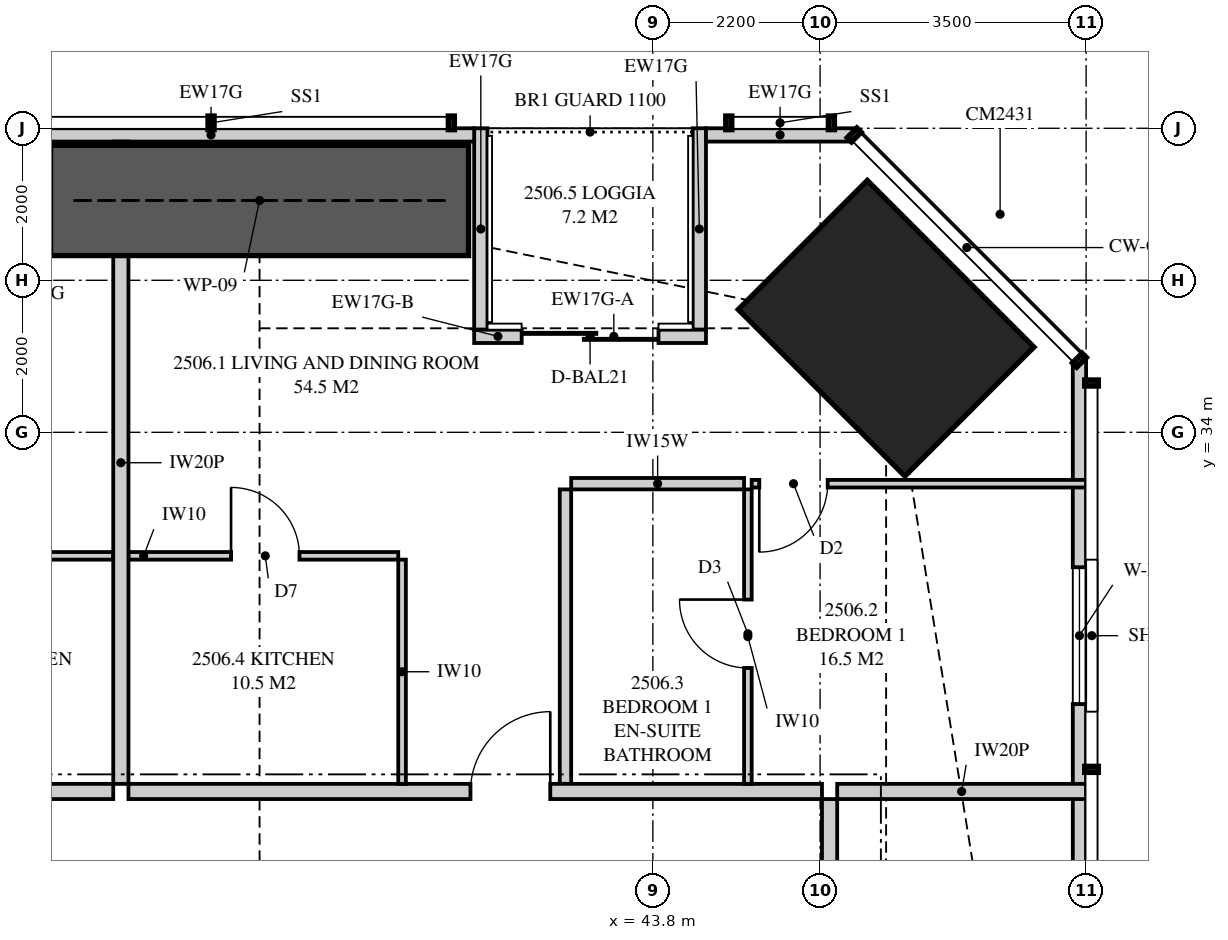
"""IFC4 building model, lengths in metres.
Left out: names, types, materials, properties, quantities, classifications, styles, units other than length and angle.
Written with IfcOpenShell. Run it as: python <this file> out.ifc"""

import sys

from ifc_helpers import new_model, si_unit, direction, frame, frame_2d, origin, origin_2d, place, context, subcontext, project, spatial, polyline, rectangle, outline, extrude, element, fill, save


model = new_model("IFC4")
c1 = context("Model", 3, precision=1e-05, world=origin(), true_north=direction((0.0, 1.0)))
c2 = subcontext(c1, "Body", "Model", "MODEL_VIEW")
j1 = project(units=[si_unit("LENGTHUNIT", "METRE"), si_unit("PLANEANGLEUNIT", "RADIAN")], contexts=[c1])
p1 = place(None, origin())
s1 = spatial("IfcSite", under=j1, at=p1, CompositionType="ELEMENT")
p2 = place(p1, origin())
s2 = spatial("IfcBuilding", under=s1, at=p2, CompositionType="ELEMENT")
p3 = place(p2, frame((0.0, 0.0, 94.8)))
s3 = spatial("IfcBuildingStorey", under=s2, at=p3, CompositionType="ELEMENT", Elevation=94.8)
p4 = place(p3, frame((46.869, 35.369, 0.0), z_axis=(0.0, 0.0, 1.0), x_axis=(-0.707106781187, -0.707106781187, 0.0)))
e1 = element("IfcColumn", 1, at=p4, inside=s3, PredefinedType="COLUMN", context=c2, shape_type="SweptSolid", body=[
    extrude(rectangle(XDim=2.4, YDim=3.1, at=origin_2d()), origin(), (0.0, 0.0, 1.0), 3.35),
])
p5 = place(p3, frame((49.413, 3.051, 0.0), z_axis=(0.0, 0.0, 1.0), x_axis=(0.0, 1.0, 0.0)))
e2 = element("IfcWall", 2, at=p5, inside=s3, PredefinedType="SOLIDWALL", context=c2, shape_type="SweptSolid", body=[
    extrude(outline(polyline([(0.0, 0.0), (31.897, 0.0), (31.897, 3.11), (22.167, 3.11), (22.167, 2.15), (22.074, 2.15), (22.074, 3.11), (21.949, 3.11), (21.949, 2.15), (9.949, 2.15), (9.949, 3.11), (9.823, 3.11), (9.823, 2.15), (9.73, 2.15), (9.73, 3.11), (0.0, 3.11), (0.0, 0.0)])), frame((0.0, 0.087, 0.0), z_axis=(0.0, -1.0, 0.0), x_axis=(1.0, 0.0, 0.0)), (0.0, 0.0, 1.0), 0.175),
])
p6 = place(p5, frame((2.224, 0.0, 0.4)))
e3 = element("IfcOpeningElement", 3, at=p6, cuts=e2, PredefinedType="OPENING", context=c2, shape_type="SweptSolid", body=[
    extrude(rectangle(XDim=1.8, YDim=1.7, at=frame_2d((0.9, 0.85))), frame((0.0, 0.097, 0.0), z_axis=(0.0, -1.0, 0.0), x_axis=(1.0, 0.0, 0.0)), (0.0, 0.0, 1.0), 0.195),
])
p7 = place(p5, frame((14.849, 0.0, 0.4)))
e4 = element("IfcOpeningElement", 4, at=p7, cuts=e2, PredefinedType="OPENING", context=c2, shape_type="SweptSolid", body=[
    extrude(rectangle(XDim=1.2, YDim=1.7, at=frame_2d((0.6, 0.85))), frame((0.0, 0.097, 0.0), z_axis=(0.0, -1.0, 0.0), x_axis=(1.0, 0.0, 0.0)), (0.0, 0.0, 1.0), 0.195),
])
p8 = place(p5, frame((27.373, 0.0, 0.4)))
e5 = element("IfcOpeningElement", 5, at=p8, cuts=e2, PredefinedType="OPENING", context=c2, shape_type="SweptSolid", body=[
    extrude(rectangle(XDim=1.8, YDim=1.7, at=frame_2d((0.9, 0.85))), frame((0.0, 0.097, 0.0), z_axis=(0.0, -1.0, 0.0), x_axis=(1.0, 0.0, 0.0)), (0.0, 0.0, 1.0), 0.195),
])
p9 = place(p3, frame((46.449, 37.913, 0.0), z_axis=(0.0, 0.0, 1.0), x_axis=(-1.0, 0.0, 0.0)))
e6 = element("IfcWall", 6, at=p9, inside=s3, PredefinedType="SOLIDWALL", context=c2, shape_type="SweptSolid", body=[
    extrude(rectangle(XDim=1.95, YDim=0.175, at=frame_2d((0.975, 0.0))), origin(), (0.0, 0.0, 1.0), 3.11),
])
p10 = place(p3, frame((41.449, 37.913, 0.0), z_axis=(0.0, 0.0, 1.0), x_axis=(-1.0, 0.0, 0.0)))
e7 = element("IfcWall", 7, at=p10, inside=s3, PredefinedType="SOLIDWALL", context=c2, shape_type="SweptSolid", body=[
    extrude(outline(polyline([(0.0, 0.0), (6.924, 0.0), (6.924, 2.15), (2.824, 2.15), (2.824, 3.11), (2.666, 3.11), (2.666, 2.15), (2.62, 2.15), (2.62, 3.11), (0.0, 3.11), (0.0, 0.0)])), frame((0.0, 0.087, 0.0), z_axis=(0.0, -1.0, 0.0), x_axis=(1.0, 0.0, 0.0)), (0.0, 0.0, 1.0), 0.175),
])
p11 = place(p3, frame((44.499, 35.262, 0.0), z_axis=(0.0, 0.0, 1.0), x_axis=(-1.0, 0.0, 0.0)))
e8 = element("IfcWall", 8, at=p11, inside=s3, PredefinedType="SOLIDWALL", context=c2, shape_type="SweptSolid", body=[
    extrude(rectangle(XDim=2.425, YDim=0.175, at=frame_2d((1.212, 0.0))), origin(), (0.0, 0.0, 1.0), 2.15),
])
p12 = place(p11, frame((0.625, 0.0, 0.0)))
e9 = element("IfcOpeningElement", 9, at=p12, cuts=e8, PredefinedType="OPENING", context=c2, shape_type="SweptSolid", body=[
    extrude(rectangle(XDim=1.8, YDim=2.1, at=frame_2d((0.9, 1.05))), frame((0.0, 0.097, 0.0), z_axis=(0.0, -1.0, 0.0), x_axis=(1.0, 0.0, 0.0)), (0.0, 0.0, 1.0), 0.195),
])
p13 = place(p3, frame((42.074, 35.262, 0.0), z_axis=(0.0, 0.0, 1.0), x_axis=(-1.0, 0.0, 0.0)))
e10 = element("IfcWall", 10, at=p13, inside=s3, PredefinedType="SOLIDWALL", context=c2, shape_type="SweptSolid", body=[
    extrude(rectangle(XDim=0.625, YDim=0.175, at=frame_2d((0.312, 0.0))), origin(), (0.0, 0.0, 1.0), 2.51),
])
p14 = place(p3, frame((44.411, 38.0, 0.0), z_axis=(0.0, 0.0, 1.0), x_axis=(0.0, -1.0, 0.0)))
e11 = element("IfcWall", 11, at=p14, inside=s3, PredefinedType="SOLIDWALL", context=c2, shape_type="SweptSolid", body=[
    extrude(outline(polyline([(0.0, 0.0), (2.65, 0.0), (2.65, 2.15), (1.296, 2.15), (1.296, 3.11), (0.0, 3.11), (0.0, 0.0)])), frame((0.0, 0.087, 0.0), z_axis=(0.0, -1.0, 0.0), x_axis=(1.0, 0.0, 0.0)), (0.0, 0.0, 1.0), 0.175),
])
p15 = place(p3, frame((41.536, 38.0, 0.0), z_axis=(0.0, 0.0, 1.0), x_axis=(0.0, -1.0, 0.0)))
e12 = element("IfcWall", 12, at=p15, inside=s3, PredefinedType="SOLIDWALL", context=c2, shape_type="SweptSolid", body=[
    extrude(outline(polyline([(0.0, 0.0), (2.65, 0.0), (2.65, 2.51), (2.378, 2.51), (2.378, 2.15), (0.709, 2.15), (0.709, 3.11), (0.0, 3.11), (0.0, 0.0)])), frame((0.0, 0.087, 0.0), z_axis=(0.0, -1.0, 0.0), x_axis=(1.0, 0.0, 0.0)), (0.0, 0.0, 1.0), 0.175),
])
p16 = place(p3, frame((36.8, 37.825, 0.0), z_axis=(0.0, 0.0, 1.0), x_axis=(0.0, -1.0, 0.0)))
e13 = element("IfcWall", 13, at=p16, inside=s3, PredefinedType="PARTITIONING", context=c2, shape_type="SweptSolid", body=[
    extrude(outline(polyline([(0.529, 2.15), (0.0, 2.15), (0.0, 0.0), (0.529, 0.0), (0.529, 0.256), (1.021, 0.256), (1.021, 0.0), (8.45, 0.0), (8.45, 3.11), (1.685, 3.11), (1.685, 2.15), (1.021, 2.15), (1.021, 1.894), (0.529, 1.894), (0.529, 2.15)])), frame((0.0, 0.1, 0.0), z_axis=(0.0, -1.0, 0.0), x_axis=(1.0, 0.0, 0.0)), (0.0, 0.0, 1.0), 0.2),
])
p17 = place(p3, frame((29.3, 29.275, 0.0), z_axis=(0.0, 0.0, 1.0), x_axis=(1.0, 0.0, 0.0)))
e14 = element("IfcWall", 14, at=p17, inside=s3, PredefinedType="PARTITIONING", context=c2, shape_type="SweptSolid", body=[
    extrude(rectangle(XDim=7.4, YDim=0.2, at=frame_2d((3.7, 0.0))), origin(), (0.0, 0.0, 1.0), 3.11),
])
p18 = place(p17, frame((3.2, 0.0, 0.0)))
e15 = element("IfcOpeningElement", 15, at=p18, cuts=e14, PredefinedType="OPENING", context=c2, shape_type="SweptSolid", body=[
    extrude(rectangle(XDim=1.05, YDim=2.2, at=frame_2d((0.525, 1.1))), frame((0.0, 0.11, 0.0), z_axis=(0.0, -1.0, 0.0), x_axis=(1.0, 0.0, 0.0)), (0.0, 0.0, 1.0), 0.22),
])
p19 = place(p3, frame((33.75, 32.375, 0.0), z_axis=(0.0, 0.0, 1.0), x_axis=(1.0, 0.0, 0.0)))
e16 = element("IfcWall", 16, at=p19, inside=s3, PredefinedType="PARTITIONING", context=c2, shape_type="SweptSolid", body=[
    extrude(rectangle(XDim=2.95, YDim=0.1, at=frame_2d((1.475, 0.0))), origin(), (0.0, 0.0, 1.0), 3.11),
])
p20 = place(p19, frame((1.0, 0.0, 0.0)))
e17 = element("IfcOpeningElement", 17, at=p20, cuts=e16, PredefinedType="OPENING", context=c2, shape_type="SweptSolid", body=[
    extrude(rectangle(XDim=0.9, YDim=2.1, at=frame_2d((0.45, 1.05))), frame((0.0, 0.06, 0.0), z_axis=(0.0, -1.0, 0.0), x_axis=(1.0, 0.0, 0.0)), (0.0, 0.0, 1.0), 0.12),
])
p21 = place(p3, frame((36.9, 29.275, 0.0), z_axis=(0.0, 0.0, 1.0), x_axis=(1.0, 0.0, 0.0)))
e18 = element("IfcWall", 18, at=p21, inside=s3, PredefinedType="PARTITIONING", context=c2, shape_type="SweptSolid", body=[
    extrude(outline(polyline([(0.0, 0.0), (9.125, 0.0), (9.125, 3.11), (2.062, 3.11), (2.062, 2.541), (1.388, 2.541), (1.388, 3.11), (0.0, 3.11), (0.0, 0.0)])), frame((0.0, 0.1, 0.0), z_axis=(0.0, -1.0, 0.0), x_axis=(1.0, 0.0, 0.0)), (0.0, 0.0, 1.0), 0.2),
])
p22 = place(p21, frame((4.5, 0.0, 0.0)))
e19 = element("IfcOpeningElement", 19, at=p22, cuts=e18, PredefinedType="OPENING", context=c2, shape_type="SweptSolid", body=[
    extrude(rectangle(XDim=1.05, YDim=2.2, at=frame_2d((0.525, 1.1))), frame((0.0, 0.11, 0.0), z_axis=(0.0, -1.0, 0.0), x_axis=(1.0, 0.0, 0.0)), (0.0, 0.0, 1.0), 0.22),
])
p23 = place(p3, frame((45.05, 33.249, 0.0), z_axis=(0.0, 0.0, 1.0), x_axis=(0.0, -1.0, 0.0)))
e20 = element("IfcWall", 20, at=p23, inside=s3, PredefinedType="PARTITIONING", context=c2, shape_type="SweptSolid", body=[
    extrude(rectangle(XDim=3.874, YDim=0.1, at=frame_2d((1.937, 0.0))), origin(), (0.0, 0.0, 1.0), 3.11),
])
p24 = place(p23, frame((1.45, 0.0, 0.0)))
e21 = element("IfcOpeningElement", 21, at=p24, cuts=e20, PredefinedType="OPENING", context=c2, shape_type="SweptSolid", body=[
    extrude(rectangle(XDim=0.9, YDim=2.1, at=frame_2d((0.45, 1.05))), frame((0.0, 0.06, 0.0), z_axis=(0.0, -1.0, 0.0), x_axis=(1.0, 0.0, 0.0)), (0.0, 0.0, 1.0), 0.12),
])
p25 = place(p3, frame((45.1, 33.324, 0.0), z_axis=(0.0, 0.0, 1.0), x_axis=(1.0, 0.0, 0.0)))
e22 = element("IfcWall", 22, at=p25, inside=s3, PredefinedType="PARTITIONING", context=c2, shape_type="SweptSolid", body=[
    extrude(outline(polyline([(0.0, 0.0), (4.4, 0.0), (4.4, 3.11), (2.971, 3.11), (2.971, 2.15), (1.229, 2.15), (1.229, 3.11), (0.0, 3.11), (0.0, 0.0)])), frame((0.0, 0.05, 0.0), z_axis=(0.0, -1.0, 0.0), x_axis=(1.0, 0.0, 0.0)), (0.0, 0.0, 1.0), 0.1),
])
p26 = place(p25, frame((0.1, 0.0, 0.0)))
e23 = element("IfcOpeningElement", 23, at=p26, cuts=e22, PredefinedType="OPENING", context=c2, shape_type="SweptSolid", body=[
    extrude(rectangle(XDim=0.9, YDim=2.1, at=frame_2d((0.45, 1.05))), frame((0.0, 0.06, 0.0), z_axis=(0.0, -1.0, 0.0), x_axis=(1.0, 0.0, 0.0)), (0.0, 0.0, 1.0), 0.12),
])
p27 = place(p3, frame((42.725, 33.324, 0.0), z_axis=(0.0, 0.0, 1.0), x_axis=(1.0, 0.0, 0.0)))
e24 = element("IfcWall", 24, at=p27, inside=s3, PredefinedType="PLUMBINGWALL", context=c2, shape_type="SweptSolid", body=[
    extrude(rectangle(XDim=2.275, YDim=0.15, at=frame_2d((1.137, 0.0))), origin(), (0.0, 0.0, 1.0), 3.11),
])
p28 = place(p3, frame((42.65, 33.249, 0.0), z_axis=(0.0, 0.0, 1.0), x_axis=(0.0, -1.0, 0.0)))
e25 = element("IfcWall", 25, at=p28, inside=s3, PredefinedType="PLUMBINGWALL", context=c2, shape_type="SweptSolid", body=[
    extrude(rectangle(XDim=3.874, YDim=0.15, at=frame_2d((1.937, 0.0))), origin(), (0.0, 0.0, 1.0), 3.11),
])
p29 = place(p3, frame((36.9, 32.375, 0.0), z_axis=(0.0, 0.0, 1.0), x_axis=(1.0, 0.0, 0.0)))
e26 = element("IfcWall", 26, at=p29, inside=s3, PredefinedType="PARTITIONING", context=c2, shape_type="SweptSolid", body=[
    extrude(outline(polyline([(0.0, 0.0), (3.55, 0.0), (3.55, 3.11), (2.012, 3.11), (2.012, 2.541), (1.438, 2.541), (1.438, 3.11), (0.0, 3.11), (0.0, 0.0)])), frame((0.0, 0.05, 0.0), z_axis=(0.0, -1.0, 0.0), x_axis=(1.0, 0.0, 0.0)), (0.0, 0.0, 1.0), 0.1),
])
p30 = place(p29, frame((1.35, 0.0, 0.0)))
e27 = element("IfcOpeningElement", 27, at=p30, cuts=e26, PredefinedType="OPENING", context=c2, shape_type="SweptSolid", body=[
    extrude(rectangle(XDim=0.9, YDim=2.1, at=frame_2d((0.45, 1.05))), frame((0.0, 0.06, 0.0), z_axis=(0.0, -1.0, 0.0), x_axis=(1.0, 0.0, 0.0)), (0.0, 0.0, 1.0), 0.12),
])
p31 = place(p3, frame((40.5, 32.325, 0.0), z_axis=(0.0, 0.0, 1.0), x_axis=(0.0, -1.0, 0.0)))
e28 = element("IfcWall", 28, at=p31, inside=s3, PredefinedType="PARTITIONING", context=c2, shape_type="SweptSolid", body=[
    extrude(rectangle(XDim=2.95, YDim=0.1, at=frame_2d((1.475, 0.0))), origin(), (0.0, 0.0, 1.0), 3.11),
])
p32 = place(p3, frame((46.225, 29.275, 0.0), z_axis=(0.0, 0.0, 1.0), x_axis=(1.0, 0.0, 0.0)))
e29 = element("IfcWall", 29, at=p32, inside=s3, PredefinedType="PARTITIONING", context=c2, shape_type="SweptSolid", body=[
    extrude(outline(polyline([(0.0, 0.0), (3.275, 0.0), (3.275, 3.11), (2.554, 3.11), (2.554, 2.15), (0.805, 2.15), (0.805, 2.541), (0.306, 2.541), (0.306, 3.11), (0.0, 3.11), (0.0, 0.0)])), frame((0.0, 0.1, 0.0), z_axis=(0.0, -1.0, 0.0), x_axis=(1.0, 0.0, 0.0)), (0.0, 0.0, 1.0), 0.2),
])
p33 = place(p3, frame((46.125, 20.7, 0.0), z_axis=(0.0, 0.0, 1.0), x_axis=(0.0, 1.0, 0.0)))
e30 = element("IfcWall", 30, at=p33, inside=s3, PredefinedType="PARTITIONING", context=c2, shape_type="SweptSolid", body=[
    extrude(outline(polyline([(0.0, 0.0), (8.475, 0.0), (8.475, 3.11), (4.637, 3.11), (4.637, 2.541), (3.963, 2.541), (3.963, 3.11), (0.0, 3.11), (0.0, 0.0)])), frame((0.0, 0.1, 0.0), z_axis=(0.0, -1.0, 0.0), x_axis=(1.0, 0.0, 0.0)), (0.0, 0.0, 1.0), 0.2),
])
p34 = place(p33, frame((6.625, 0.0, 0.0)))
e31 = element("IfcOpeningElement", 31, at=p34, cuts=e30, PredefinedType="OPENING", context=c2, shape_type="SweptSolid", body=[
    extrude(rectangle(XDim=1.0, YDim=2.1, at=frame_2d((0.5, 1.05))), frame((0.0, 0.11, 0.0), z_axis=(0.0, -1.0, 0.0), x_axis=(1.0, 0.0, 0.0)), (0.0, 0.0, 1.0), 0.22),
])
p35 = place(p3, frame((35.875, 37.05, 0.0), z_axis=(0.0, 0.0, 1.0), x_axis=(1.0, 0.0, 0.0)))
e32 = element("IfcWall", 32, at=p35, inside=s3, PredefinedType="SHEAR", context=c2, shape_type="SweptSolid", body=[
    extrude(rectangle(XDim=5.5, YDim=1.45, at=frame_2d((2.75, 0.0))), origin(), (0.0, 0.0, 1.0), 3.35),
])
p36 = place(p8, origin())
e33 = element("IfcWindow", 33, at=p36, inside=s3, PartitioningType="SINGLE_PANEL", PredefinedType="WINDOW", context=c2, shape_type="SweptSolid", body=[
    extrude(rectangle(XDim=1.8, YDim=1.7, at=frame_2d((0.9, 0.85))), frame((0.0, 0.03, 0.0), z_axis=(0.0, -1.0, 0.0), x_axis=(1.0, 0.0, 0.0)), (0.0, 0.0, 1.0), 0.06),
])
fill(e5, e33)
p37 = place(p12, origin())
e34 = element("IfcDoor", 34, at=p37, inside=s3, OperationType="SLIDING_TO_LEFT", PredefinedType="DOOR", context=c2, shape_type="SweptSolid", body=[
    extrude(rectangle(XDim=1.8, YDim=2.1, at=frame_2d((0.9, 1.05))), frame((0.0, 0.025, 0.0), z_axis=(0.0, -1.0, 0.0), x_axis=(1.0, 0.0, 0.0)), (0.0, 0.0, 1.0), 0.05),
])
fill(e9, e34)
p38 = place(p22, origin())
e35 = element("IfcDoor", 35, at=p38, inside=s3, OperationType="SINGLE_SWING_RIGHT", PredefinedType="DOOR", context=c2, shape_type="SweptSolid", body=[
    extrude(rectangle(XDim=1.05, YDim=2.2, at=frame_2d((0.525, 1.1))), frame((0.0, 0.025, 0.0), z_axis=(0.0, -1.0, 0.0), x_axis=(1.0, 0.0, 0.0)), (0.0, 0.0, 1.0), 0.05),
])
fill(e19, e35)
p39 = place(p26, frame((0.9, 0.0, 0.0), z_axis=(0.0, 0.0, 1.0), x_axis=(-1.0, 0.0, 0.0)))
e36 = element("IfcDoor", 36, at=p39, inside=s3, OperationType="SINGLE_SWING_RIGHT", PredefinedType="DOOR", context=c2, shape_type="SweptSolid", body=[
    extrude(rectangle(XDim=0.9, YDim=2.1, at=frame_2d((0.45, 1.05))), frame((0.0, 0.025, 0.0), z_axis=(0.0, -1.0, 0.0), x_axis=(1.0, 0.0, 0.0)), (0.0, 0.0, 1.0), 0.05),
])
fill(e23, e36)
p40 = place(p24, frame((0.9, 0.0, 0.0), z_axis=(0.0, 0.0, 1.0), x_axis=(-1.0, 0.0, 0.0)))
e37 = element("IfcDoor", 37, at=p40, inside=s3, OperationType="SINGLE_SWING_RIGHT", PredefinedType="DOOR", context=c2, shape_type="SweptSolid", body=[
    extrude(rectangle(XDim=0.9, YDim=2.1, at=frame_2d((0.45, 1.05))), frame((0.0, 0.025, 0.0), z_axis=(0.0, -1.0, 0.0), x_axis=(1.0, 0.0, 0.0)), (0.0, 0.0, 1.0), 0.05),
])
fill(e21, e37)
p41 = place(p30, origin())
e38 = element("IfcDoor", 38, at=p41, inside=s3, OperationType="SINGLE_SWING_LEFT", PredefinedType="DOOR", context=c2, shape_type="SweptSolid", body=[
    extrude(rectangle(XDim=0.9, YDim=2.1, at=frame_2d((0.45, 1.05))), frame((0.0, 0.025, 0.0), z_axis=(0.0, -1.0, 0.0), x_axis=(1.0, 0.0, 0.0)), (0.0, 0.0, 1.0), 0.05),
])
fill(e27, e38)
save(model, sys.argv[1])
